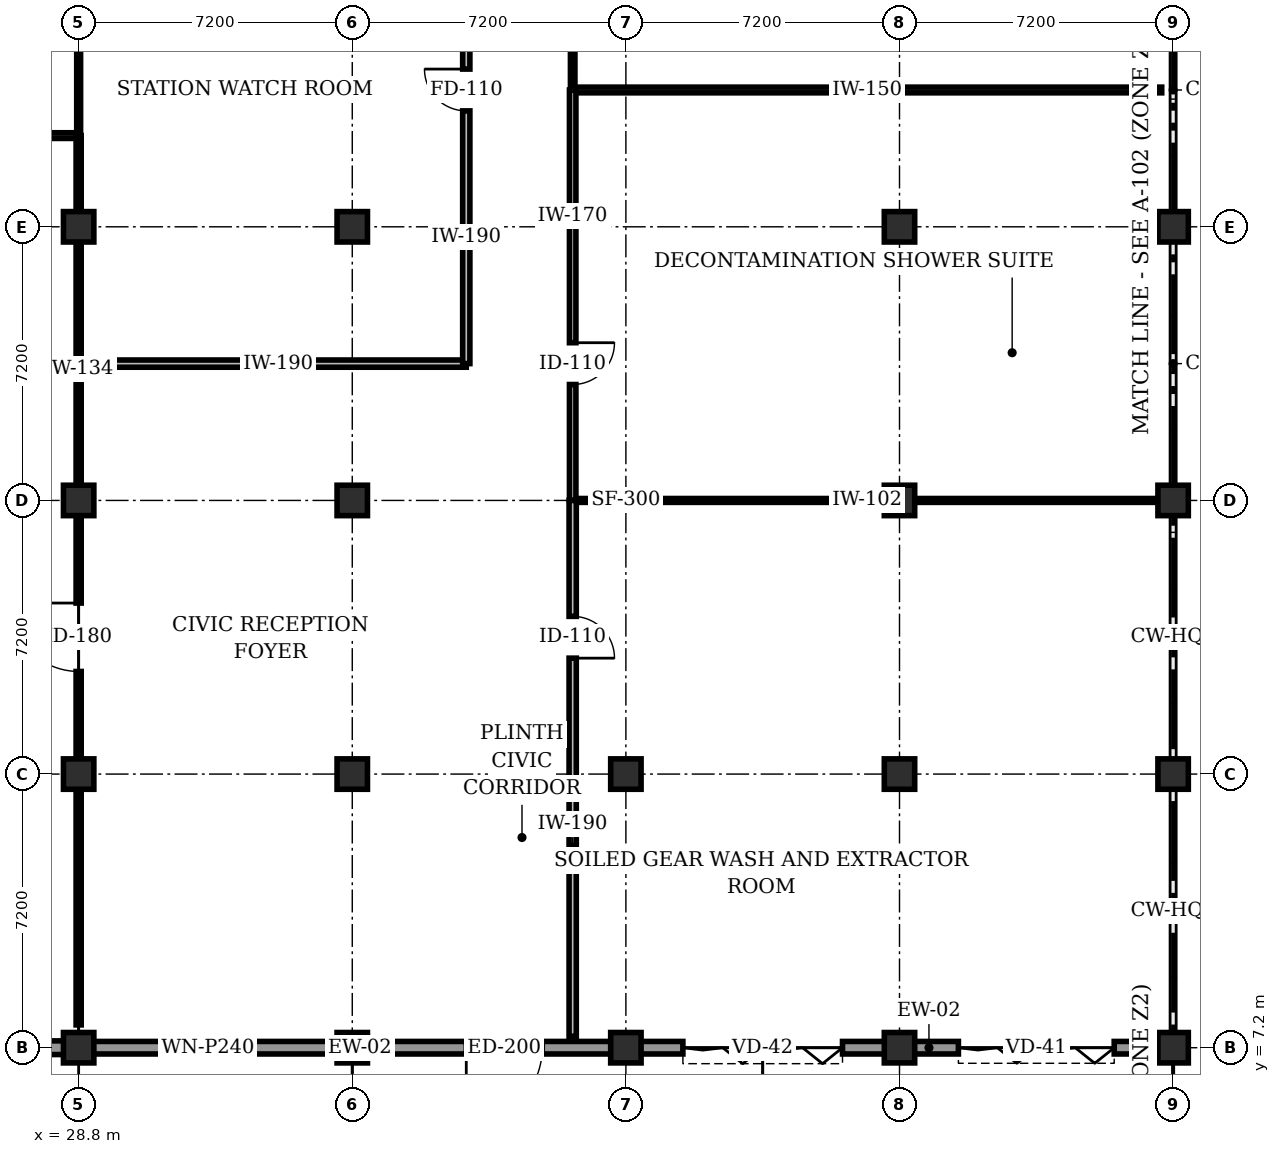
"""IFC4 building model, lengths in metres.
Left out: names, types, materials, properties, quantities, classifications, styles, units other than length and angle.
Written with IfcOpenShell. Run it as: python <this file> out.ifc"""

import sys

from ifc_helpers import new_model, si_unit, direction, frame, frame_2d, origin, origin_2d, place, context, subcontext, project, spatial, rectangle, extrude, element, fill, save


model = new_model("IFC4")
c1 = context("Model", 3, precision=1e-05, world=origin(), true_north=direction((0.0, 1.0)))
c2 = subcontext(c1, "Body", "Model", "MODEL_VIEW")
j1 = project(units=[si_unit("LENGTHUNIT", "METRE"), si_unit("PLANEANGLEUNIT", "RADIAN")], contexts=[c1])
p1 = place(None, origin())
s1 = spatial("IfcSite", under=j1, at=p1, CompositionType="ELEMENT")
p2 = place(p1, origin())
s2 = spatial("IfcBuilding", under=s1, at=p2, CompositionType="ELEMENT")
p3 = place(p2, origin())
s3 = spatial("IfcBuildingStorey", under=s2, at=p3, CompositionType="ELEMENT", Elevation=0.0)
for number, where, z_axis, x_axis in (
    (1, (28.8, 7.2, 0.0), (0.0, 0.0, 1.0), (1.0, 0.0, 0.0)),
    (2, (28.8, 14.4, 0.0), (0.0, 0.0, 1.0), (1.0, 0.0, 0.0)),
    (3, (28.8, 21.6, 0.0), (0.0, 0.0, 1.0), (1.0, 0.0, 0.0)),
    (4, (28.8, 28.8, 0.0), (0.0, 0.0, 1.0), (1.0, 0.0, 0.0)),
    (5, (36.0, 7.2, 0.0), (0.0, 0.0, 1.0), (1.0, 0.0, 0.0)),
    (6, (36.0, 14.4, 0.0), (0.0, 0.0, 1.0), (1.0, 0.0, 0.0)),
    (7, (36.0, 21.6, 0.0), (0.0, 0.0, 1.0), (1.0, 0.0, 0.0)),
    (8, (36.0, 28.8, 0.0), (0.0, 0.0, 1.0), (1.0, 0.0, 0.0)),
    (9, (43.2, 7.2, 0.0), (0.0, 0.0, 1.0), (1.0, 0.0, 0.0)),
    (10, (43.2, 14.4, 0.0), (0.0, 0.0, 1.0), (1.0, 0.0, 0.0)),
    (11, (50.4, 7.2, 0.0), (0.0, 0.0, 1.0), (1.0, 0.0, 0.0)),
    (12, (50.4, 14.4, 0.0), (0.0, 0.0, 1.0), (1.0, 0.0, 0.0)),
    (13, (50.4, 21.6, 0.0), (0.0, 0.0, 1.0), (1.0, 0.0, 0.0)),
    (14, (50.4, 28.8, 0.0), (0.0, 0.0, 1.0), (1.0, 0.0, 0.0)),
    (15, (57.6, 7.2, 0.0), (0.0, 0.0, 1.0), (1.0, 0.0, 0.0)),
    (16, (57.6, 14.4, 0.0), (0.0, 0.0, 1.0), (1.0, 0.0, 0.0)),
    (17, (57.6, 21.6, 0.0), (0.0, 0.0, 1.0), (1.0, 0.0, 0.0)),
    (18, (57.6, 28.8, 0.0), (0.0, 0.0, 1.0), (1.0, 0.0, 0.0)),
):
    element("IfcColumn", number, at=place(p3, frame(where, z_axis=z_axis, x_axis=x_axis)), inside=s3, PredefinedType="COLUMN", context=c2, shape_type="SweptSolid", body=[
        extrude(rectangle(XDim=0.8, YDim=0.8, at=origin_2d()), origin(), (0.0, 0.0, 1.0), 6.0),
    ])
p4 = place(p3, frame((24.0, 7.2, 0.0), z_axis=(0.0, 0.0, 1.0), x_axis=(1.0, 0.0, 0.0)))
e19 = element("IfcWall", 19, at=p4, inside=s3, PredefinedType="STANDARD", context=c2, shape_type="SweptSolid", body=[
    extrude(rectangle(XDim=4.8, YDim=0.36, at=frame_2d((2.4, 0.0))), origin(), (0.0, 0.0, 1.0), 5.08),
])
p5 = place(p3, frame((43.2, 7.2, 0.0), z_axis=(0.0, 0.0, 1.0), x_axis=(-1.0, 0.0, 0.0)))
e20 = element("IfcWall", 20, at=p5, inside=s3, PredefinedType="STANDARD", context=c2, shape_type="SweptSolid", body=[
    extrude(rectangle(XDim=14.4, YDim=0.33, at=frame_2d((7.2, 0.0))), origin(), (0.0, 0.0, 1.0), 5.08),
])
p6 = place(p5, frame((2.2, 0.0, 0.0)))
e21 = element("IfcOpeningElement", 21, at=p6, cuts=e20, PredefinedType="OPENING", context=c2, shape_type="SweptSolid", body=[
    extrude(rectangle(XDim=2.0, YDim=2.4, at=frame_2d((1.0, 1.2))), frame((0.0, 0.175, 0.0), z_axis=(0.0, -1.0, 0.0), x_axis=(1.0, 0.0, 0.0)), (0.0, 0.0, 1.0), 0.35),
])
p7 = place(p5, frame((9.8, 0.0, 1.1)))
e22 = element("IfcOpeningElement", 22, at=p7, cuts=e20, PredefinedType="OPENING", context=c2, shape_type="SweptSolid", body=[
    extrude(rectangle(XDim=2.4, YDim=1.82, at=frame_2d((1.2, 0.91))), frame((0.0, 0.175, 0.0), z_axis=(0.0, -1.0, 0.0), x_axis=(1.0, 0.0, 0.0)), (0.0, 0.0, 1.0), 0.35),
])
p8 = place(p3, frame((50.4, 7.2, 0.0), z_axis=(0.0, 0.0, 1.0), x_axis=(-1.0, 0.0, 0.0)))
e23 = element("IfcWall", 23, at=p8, inside=s3, PredefinedType="STANDARD", context=c2, shape_type="SweptSolid", body=[
    extrude(rectangle(XDim=7.2, YDim=0.33, at=frame_2d((3.6, 0.0))), origin(), (0.0, 0.0, 1.0), 4.54),
])
p9 = place(p8, frame((1.5, 0.0, 0.0)))
e24 = element("IfcOpeningElement", 24, at=p9, cuts=e23, PredefinedType="OPENING", context=c2, shape_type="SweptSolid", body=[
    extrude(rectangle(XDim=4.2, YDim=4.4, at=frame_2d((2.1, 2.2))), frame((0.0, 0.175, 0.0), z_axis=(0.0, -1.0, 0.0), x_axis=(1.0, 0.0, 0.0)), (0.0, 0.0, 1.0), 0.35),
])
p10 = place(p3, frame((57.6, 7.2, 0.0), z_axis=(0.0, 0.0, 1.0), x_axis=(-1.0, 0.0, 0.0)))
e25 = element("IfcWall", 25, at=p10, inside=s3, PredefinedType="STANDARD", context=c2, shape_type="SweptSolid", body=[
    extrude(rectangle(XDim=7.2, YDim=0.33, at=frame_2d((3.6, 0.0))), origin(), (0.0, 0.0, 1.0), 4.54),
])
p11 = place(p10, frame((1.55, 0.0, 0.0)))
e26 = element("IfcOpeningElement", 26, at=p11, cuts=e25, PredefinedType="OPENING", context=c2, shape_type="SweptSolid", body=[
    extrude(rectangle(XDim=4.1, YDim=4.4, at=frame_2d((2.05, 2.2))), frame((0.0, 0.175, 0.0), z_axis=(0.0, -1.0, 0.0), x_axis=(1.0, 0.0, 0.0)), (0.0, 0.0, 1.0), 0.35),
])
p12 = place(p3, frame((28.8, 31.2, 0.0), z_axis=(0.0, 0.0, 1.0), x_axis=(-1.0, 0.0, 0.0)))
e27 = element("IfcWall", 27, at=p12, inside=s3, PredefinedType="STANDARD", context=c2, shape_type="SweptSolid", body=[
    extrude(rectangle(XDim=28.4, YDim=0.15, at=frame_2d((14.2, 0.0))), origin(), (0.0, 0.0, 1.0), 5.103),
])
p13 = place(p3, frame((28.8, 7.8, 0.0), z_axis=(0.0, 0.0, 1.0), x_axis=(0.0, 1.0, 0.0)))
e28 = element("IfcWall", 28, at=p13, inside=s3, PredefinedType="STANDARD", context=c2, shape_type="SweptSolid", body=[
    extrude(rectangle(XDim=23.4, YDim=0.134, at=frame_2d((11.7, 0.0))), origin(), (0.0, 0.0, 1.0), 5.022),
])
p14 = place(p13, frame((9.3, 0.0, 0.0)))
e29 = element("IfcOpeningElement", 29, at=p14, cuts=e28, PredefinedType="OPENING", context=c2, shape_type="SweptSolid", body=[
    extrude(rectangle(XDim=1.8, YDim=2.36, at=frame_2d((0.9, 1.18))), frame((0.0, 0.077, 0.0), z_axis=(0.0, -1.0, 0.0), x_axis=(1.0, 0.0, 0.0)), (0.0, 0.0, 1.0), 0.154),
])
p15 = place(p3, frame((28.8, 31.2, 0.0), z_axis=(0.0, 0.0, 1.0), x_axis=(0.0, 1.0, 0.0)))
e30 = element("IfcWall", 30, at=p15, inside=s3, PredefinedType="STANDARD", context=c2, shape_type="SweptSolid", body=[
    extrude(rectangle(XDim=23.4, YDim=0.102, at=frame_2d((11.7, 0.0))), origin(), (0.0, 0.0, 1.0), 5.022),
])
p16 = place(p15, frame((14.73, 0.0, 0.0)))
e31 = element("IfcOpeningElement", 31, at=p16, cuts=e30, PredefinedType="OPENING", context=c2, shape_type="SweptSolid", body=[
    extrude(rectangle(XDim=1.74, YDim=2.34, at=frame_2d((0.87, 1.17))), frame((0.0, 0.061, 0.0), z_axis=(0.0, -1.0, 0.0), x_axis=(1.0, 0.0, 0.0)), (0.0, 0.0, 1.0), 0.122),
])
p17 = place(p3, frame((29.1, 25.2, 0.0), z_axis=(0.0, 0.0, 1.0), x_axis=(1.0, 0.0, 0.0)))
e32 = element("IfcWall", 32, at=p17, inside=s3, PredefinedType="STANDARD", context=c2, shape_type="SweptSolid", body=[
    extrude(rectangle(XDim=9.9, YDim=0.19, at=frame_2d((4.95, 0.0))), origin(), (0.0, 0.0, 1.0), 5.178),
])
p18 = place(p3, frame((39.0, 25.2, 0.0), z_axis=(0.0, 0.0, 1.0), x_axis=(0.0, 1.0, 0.0)))
e33 = element("IfcWall", 33, at=p18, inside=s3, PredefinedType="STANDARD", context=c2, shape_type="SweptSolid", body=[
    extrude(rectangle(XDim=14.4, YDim=0.19, at=frame_2d((7.2, 0.0))), origin(), (0.0, 0.0, 1.0), 4.939),
])
p19 = place(p18, frame((6.65, 0.0, 0.0)))
e34 = element("IfcOpeningElement", 34, at=p19, cuts=e33, PredefinedType="OPENING", context=c2, shape_type="SweptSolid", body=[
    extrude(rectangle(XDim=1.1, YDim=2.16, at=frame_2d((0.55, 1.08))), frame((0.0, 0.105, 0.0), z_axis=(0.0, -1.0, 0.0), x_axis=(1.0, 0.0, 0.0)), (0.0, 0.0, 1.0), 0.21),
])
p20 = place(p3, frame((41.8, 32.4, 0.0), z_axis=(0.0, 0.0, 1.0), x_axis=(1.0, 0.0, 0.0)))
e35 = element("IfcWall", 35, at=p20, inside=s3, PredefinedType="STANDARD", context=c2, shape_type="SweptSolid", body=[
    extrude(rectangle(XDim=15.5, YDim=0.15, at=frame_2d((7.75, 0.0))), origin(), (0.0, 0.0, 1.0), 5.103),
])
p21 = place(p3, frame((41.8, 43.2, 0.0), z_axis=(0.0, 0.0, 1.0), x_axis=(0.0, -1.0, 0.0)))
e36 = element("IfcWall", 36, at=p21, inside=s3, PredefinedType="STANDARD", context=c2, shape_type="SweptSolid", body=[
    extrude(rectangle(XDim=10.8, YDim=0.118, at=frame_2d((5.4, 0.0))), origin(), (0.0, 0.0, 1.0), 4.939),
])
p22 = place(p21, frame((3.04, 0.0, 0.0)))
e37 = element("IfcOpeningElement", 37, at=p22, cuts=e36, PredefinedType="OPENING", context=c2, shape_type="SweptSolid", body=[
    extrude(rectangle(XDim=1.12, YDim=2.2, at=frame_2d((0.56, 1.1))), frame((0.0, 0.069, 0.0), z_axis=(0.0, -1.0, 0.0), x_axis=(1.0, 0.0, 0.0)), (0.0, 0.0, 1.0), 0.138),
])
p23 = place(p3, frame((41.8, 21.6, 0.0), z_axis=(0.0, 0.0, 1.0), x_axis=(1.0, 0.0, 0.0)))
e38 = element("IfcWall", 38, at=p23, inside=s3, PredefinedType="STANDARD", context=c2, shape_type="SweptSolid", body=[
    extrude(rectangle(XDim=15.5, YDim=0.102, at=frame_2d((7.75, 0.0))), origin(), (0.0, 0.0, 1.0), 4.944),
])
p24 = place(p3, frame((41.8, 32.4, 0.0), z_axis=(0.0, 0.0, 1.0), x_axis=(0.0, -1.0, 0.0)))
e39 = element("IfcWall", 39, at=p24, inside=s3, PredefinedType="STANDARD", context=c2, shape_type="SweptSolid", body=[
    extrude(rectangle(XDim=10.8, YDim=0.17, at=frame_2d((5.4, 0.0))), origin(), (0.0, 0.0, 1.0), 4.939),
])
p25 = place(p24, frame((6.65, 0.0, 0.0)))
e40 = element("IfcOpeningElement", 40, at=p25, cuts=e39, PredefinedType="OPENING", context=c2, shape_type="SweptSolid", body=[
    extrude(rectangle(XDim=1.1, YDim=2.2, at=frame_2d((0.55, 1.1))), frame((0.0, 0.095, 0.0), z_axis=(0.0, -1.0, 0.0), x_axis=(1.0, 0.0, 0.0)), (0.0, 0.0, 1.0), 0.19),
])
p26 = place(p3, frame((41.8, 21.6, 0.0), z_axis=(0.0, 0.0, 1.0), x_axis=(0.0, -1.0, 0.0)))
e41 = element("IfcWall", 41, at=p26, inside=s3, PredefinedType="STANDARD", context=c2, shape_type="SweptSolid", body=[
    extrude(rectangle(XDim=14.1, YDim=0.19, at=frame_2d((7.05, 0.0))), origin(), (0.0, 0.0, 1.0), 4.944),
])
p27 = place(p26, frame((3.05, 0.0, 0.0)))
e42 = element("IfcOpeningElement", 42, at=p27, cuts=e41, PredefinedType="OPENING", context=c2, shape_type="SweptSolid", body=[
    extrude(rectangle(XDim=1.1, YDim=2.2, at=frame_2d((0.55, 1.1))), frame((0.0, 0.105, 0.0), z_axis=(0.0, -1.0, 0.0), x_axis=(1.0, 0.0, 0.0)), (0.0, 0.0, 1.0), 0.21),
])
p28 = place(p6, origin())
e43 = element("IfcDoor", 43, at=p28, inside=s3, OperationType="SINGLE_SWING_RIGHT", PredefinedType="DOOR", context=c2, shape_type="SweptSolid", body=[
    extrude(rectangle(XDim=2.0, YDim=2.4, at=frame_2d((1.0, 1.2))), frame((0.0, 0.025, 0.0), z_axis=(0.0, -1.0, 0.0), x_axis=(1.0, 0.0, 0.0)), (0.0, 0.0, 1.0), 0.05),
])
fill(e21, e43)
p29 = place(p7, origin())
e44 = element("IfcWindow", 44, at=p29, inside=s3, PartitioningType="SINGLE_PANEL", PredefinedType="WINDOW", context=c2, shape_type="SweptSolid", body=[
    extrude(rectangle(XDim=2.4, YDim=1.82, at=frame_2d((1.2, 0.91))), frame((0.0, 0.03, 0.0), z_axis=(0.0, -1.0, 0.0), x_axis=(1.0, 0.0, 0.0)), (0.0, 0.0, 1.0), 0.06),
])
fill(e22, e44)
p30 = place(p9, origin())
e45 = element("IfcDoor", 45, at=p30, inside=s3, OperationType="FOLDING_TO_LEFT", PredefinedType="GATE", context=c2, shape_type="SweptSolid", body=[
    extrude(rectangle(XDim=4.2, YDim=4.4, at=frame_2d((2.1, 2.2))), frame((0.0, 0.025, 0.0), z_axis=(0.0, -1.0, 0.0), x_axis=(1.0, 0.0, 0.0)), (0.0, 0.0, 1.0), 0.05),
])
fill(e24, e45)
p31 = place(p11, origin())
e46 = element("IfcDoor", 46, at=p31, inside=s3, OperationType="FOLDING_TO_LEFT", PredefinedType="GATE", context=c2, shape_type="SweptSolid", body=[
    extrude(rectangle(XDim=4.1, YDim=4.4, at=frame_2d((2.05, 2.2))), frame((0.0, 0.025, 0.0), z_axis=(0.0, -1.0, 0.0), x_axis=(1.0, 0.0, 0.0)), (0.0, 0.0, 1.0), 0.05),
])
fill(e26, e46)
p32 = place(p14, origin())
e47 = element("IfcDoor", 47, at=p32, inside=s3, OperationType="SINGLE_SWING_RIGHT", PredefinedType="DOOR", context=c2, shape_type="SweptSolid", body=[
    extrude(rectangle(XDim=1.8, YDim=2.36, at=frame_2d((0.9, 1.18))), frame((0.0, 0.025, 0.0), z_axis=(0.0, -1.0, 0.0), x_axis=(1.0, 0.0, 0.0)), (0.0, 0.0, 1.0), 0.05),
])
fill(e29, e47)
p33 = place(p19, origin())
e48 = element("IfcDoor", 48, at=p33, inside=s3, OperationType="SINGLE_SWING_RIGHT", PredefinedType="DOOR", context=c2, shape_type="SweptSolid", body=[
    extrude(rectangle(XDim=1.1, YDim=2.16, at=frame_2d((0.55, 1.08))), frame((0.0, 0.025, 0.0), z_axis=(0.0, -1.0, 0.0), x_axis=(1.0, 0.0, 0.0)), (0.0, 0.0, 1.0), 0.05),
])
fill(e34, e48)
p34 = place(p25, origin())
e49 = element("IfcDoor", 49, at=p34, inside=s3, OperationType="SINGLE_SWING_LEFT", PredefinedType="DOOR", context=c2, shape_type="SweptSolid", body=[
    extrude(rectangle(XDim=1.1, YDim=2.2, at=frame_2d((0.55, 1.1))), frame((0.0, 0.025, 0.0), z_axis=(0.0, -1.0, 0.0), x_axis=(1.0, 0.0, 0.0)), (0.0, 0.0, 1.0), 0.05),
])
fill(e40, e49)
p35 = place(p27, origin())
e50 = element("IfcDoor", 50, at=p35, inside=s3, OperationType="SINGLE_SWING_RIGHT", PredefinedType="DOOR", context=c2, shape_type="SweptSolid", body=[
    extrude(rectangle(XDim=1.1, YDim=2.2, at=frame_2d((0.55, 1.1))), frame((0.0, 0.025, 0.0), z_axis=(0.0, -1.0, 0.0), x_axis=(1.0, 0.0, 0.0)), (0.0, 0.0, 1.0), 0.05),
])
fill(e42, e50)
save(model, sys.argv[1])
